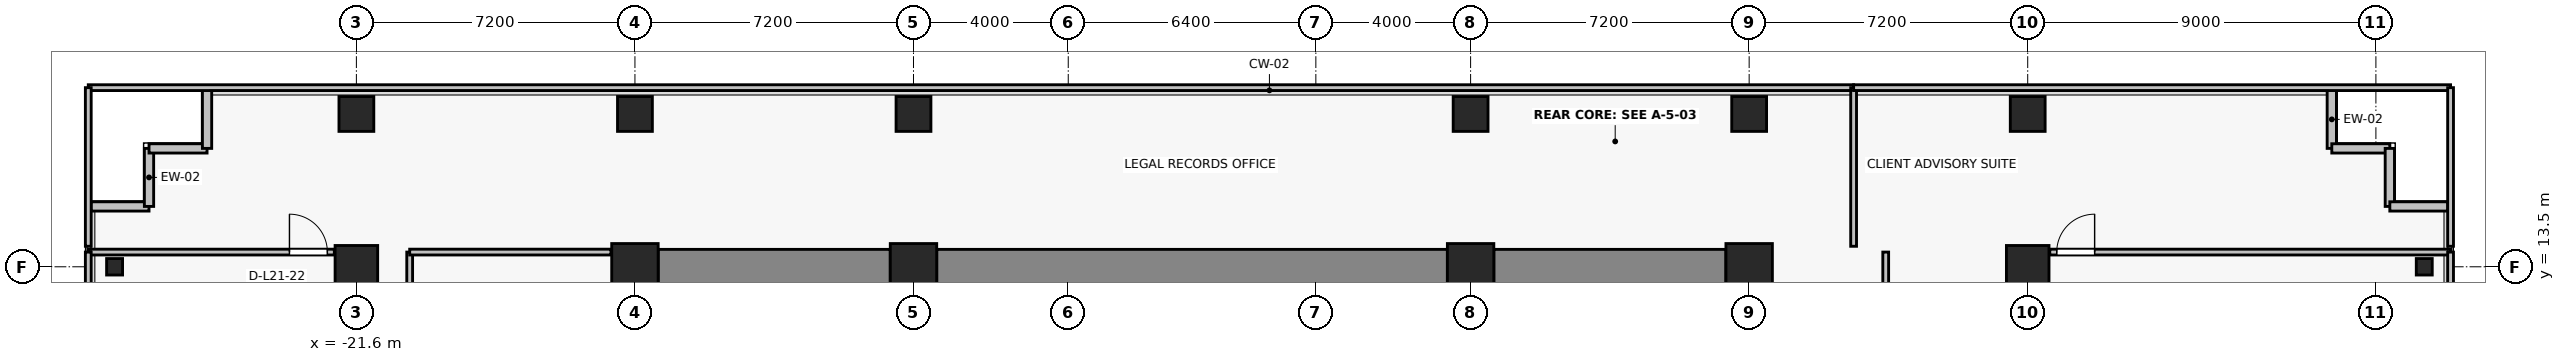
"""IFC4 building model, lengths in metres.
Left out: names, types, materials, properties, quantities, classifications, styles, units other than length and angle.
Written with IfcOpenShell. Run it as: python <this file> out.ifc"""

import sys

from ifc_helpers import new_model, si_unit, direction, frame, frame_2d, origin, origin_2d, place, context, subcontext, project, spatial, rectangle, i_section, extrude, source, transform, mapped, element, fill, save


model = new_model("IFC4")
c1 = context("Model", 3, precision=1e-05, world=origin(), true_north=direction((0.0, 1.0)))
c2 = subcontext(c1, "Body", "Model", "MODEL_VIEW")
j1 = project(units=[si_unit("LENGTHUNIT", "METRE"), si_unit("PLANEANGLEUNIT", "RADIAN")], contexts=[c1])
p1 = place(None, origin())
s1 = spatial("IfcSite", under=j1, at=p1, CompositionType="ELEMENT")
p2 = place(p1, origin())
s2 = spatial("IfcBuilding", under=s1, at=p2, CompositionType="ELEMENT")
p3 = place(p2, frame((0.0, 0.0, 76.9)))
s3 = spatial("IfcBuildingStorey", under=s2, at=p3, CompositionType="ELEMENT", Elevation=76.9)
for number, where, z_axis, x_axis in (
    (1, (-14.4, 13.5, 0.0), (0.0, 0.0, 1.0), (1.0, 0.0, 0.0)),
    (2, (-7.2, 13.5, 0.0), (0.0, 0.0, 1.0), (1.0, 0.0, 0.0)),
    (3, (7.2, 13.5, 0.0), (0.0, 0.0, 1.0), (1.0, 0.0, 0.0)),
    (4, (14.4, 13.5, 0.0), (0.0, 0.0, 1.0), (1.0, 0.0, 0.0)),
):
    element("IfcColumn", number, at=place(p3, frame(where, z_axis=z_axis, x_axis=x_axis)), inside=s3, PredefinedType="COLUMN", context=c2, shape_type="SweptSolid", body=[
        extrude(rectangle(XDim=1.2, YDim=1.2, at=origin_2d()), origin(), (0.0, 0.0, 1.0), 3.3),
    ])
for number, where, z_axis, x_axis in (
    (5, (-21.6, 13.5, 0.0), (0.0, 0.0, 1.0), (1.0, 0.0, 0.0)),
    (6, (21.6, 13.5, 0.0), (0.0, 0.0, 1.0), (1.0, 0.0, 0.0)),
):
    element("IfcColumn", number, at=place(p3, frame(where, z_axis=z_axis, x_axis=x_axis)), inside=s3, PredefinedType="COLUMN", context=c2, shape_type="SweptSolid", body=[
        extrude(rectangle(XDim=1.1, YDim=1.1, at=origin_2d()), origin(), (0.0, 0.0, 1.0), 3.3),
    ])
for number, where, z_axis, x_axis in (
    (7, (-14.4, 17.45, 0.0), (0.0, 0.0, 1.0), (1.0, 0.0, 0.0)),
    (8, (-7.2, 17.45, 0.0), (0.0, 0.0, 1.0), (1.0, 0.0, 0.0)),
    (9, (7.2, 17.45, 0.0), (0.0, 0.0, 1.0), (1.0, 0.0, 0.0)),
    (10, (14.4, 17.45, 0.0), (0.0, 0.0, 1.0), (1.0, 0.0, 0.0)),
    (11, (-21.6, 17.45, 0.0), (0.0, 0.0, 1.0), (1.0, 0.0, 0.0)),
    (12, (21.6, 17.45, 0.0), (0.0, 0.0, 1.0), (1.0, 0.0, 0.0)),
):
    element("IfcColumn", number, at=place(p3, frame(where, z_axis=z_axis, x_axis=x_axis)), inside=s3, PredefinedType="COLUMN", context=c2, shape_type="SweptSolid", body=[
        extrude(rectangle(XDim=0.9, YDim=0.9, at=origin_2d()), origin(), (0.0, 0.0, 1.0), 3.3),
    ])
for number, where, z_axis, x_axis in (
    (13, (-27.85, 13.5, 0.0), (0.0, 0.0, 1.0), (1.0, 0.0, 0.0)),
    (14, (31.85, 13.5, 0.0), (0.0, 0.0, 1.0), (1.0, 0.0, 0.0)),
):
    element("IfcColumn", number, at=place(p3, frame(where, z_axis=z_axis, x_axis=x_axis)), inside=s3, PredefinedType="COLUMN", context=c2, shape_type="SweptSolid", body=[
        extrude(i_section(OverallWidth=0.412, OverallDepth=0.425, WebThickness=0.026, FlangeThickness=0.039, FilletRadius=0.015, at=origin_2d()), origin(), (0.0, 0.0, 1.0), 3.3),
    ])
p4 = place(p3, frame((-13.8, 13.5, 0.0), z_axis=(0.0, 0.0, 1.0), x_axis=(1.0, 0.0, 0.0)))
e15 = element("IfcWall", 15, at=p4, inside=s3, PredefinedType="SHEAR", context=c2, shape_type="SweptSolid", body=[
    extrude(rectangle(XDim=6.0, YDim=0.9, at=frame_2d((3.0, 0.0))), origin(), (0.0, 0.0, 1.0), 3.05),
])
p5 = place(p3, frame((-6.6, 13.5, 0.0), z_axis=(0.0, 0.0, 1.0), x_axis=(1.0, 0.0, 0.0)))
e16 = element("IfcWall", 16, at=p5, inside=s3, PredefinedType="SHEAR", context=c2, shape_type="SweptSolid", body=[
    extrude(rectangle(XDim=13.2, YDim=0.9, at=frame_2d((6.6, 0.0))), origin(), (0.0, 0.0, 1.0), 3.05),
])
p6 = place(p3, frame((7.8, 13.5, 0.0), z_axis=(0.0, 0.0, 1.0), x_axis=(1.0, 0.0, 0.0)))
e17 = element("IfcWall", 17, at=p6, inside=s3, PredefinedType="SHEAR", context=c2, shape_type="SweptSolid", body=[
    extrude(rectangle(XDim=6.0, YDim=0.9, at=frame_2d((3.0, 0.0))), origin(), (0.0, 0.0, 1.0), 3.05),
])
for number, where, z_axis, x_axis in (
    (18, (-26.96, 15.06, 0.0), (0.0, 0.0, 1.0), (-1.0, 0.0, 0.0)),
    (19, (-26.96, 16.56, 0.0), (0.0, 0.0, 1.0), (0.0, -1.0, 0.0)),
    (20, (-25.46, 16.56, 0.0), (0.0, 0.0, 1.0), (-1.0, 0.0, 0.0)),
    (21, (-25.46, 18.06, 0.0), (0.0, 0.0, 1.0), (0.0, -1.0, 0.0)),
    (22, (29.46, 16.56, 0.0), (0.0, 0.0, 1.0), (0.0, 1.0, 0.0)),
    (23, (30.96, 16.56, 0.0), (0.0, 0.0, 1.0), (-1.0, 0.0, 0.0)),
    (24, (30.96, 15.06, 0.0), (0.0, 0.0, 1.0), (0.0, 1.0, 0.0)),
    (25, (32.46, 15.06, 0.0), (0.0, 0.0, 1.0), (-1.0, 0.0, 0.0)),
):
    element("IfcWall", number, at=place(p3, frame(where, z_axis=z_axis, x_axis=x_axis)), inside=s3, PredefinedType="SOLIDWALL", context=c2, shape_type="SweptSolid", body=[
        extrude(rectangle(XDim=1.5, YDim=0.24, at=frame_2d((0.75, 0.0))), origin(), (0.0, 0.0, 1.0), 3.05),
    ])
p7 = place(p3, frame((-28.53, 13.88, 0.0), z_axis=(0.0, 0.0, 1.0), x_axis=(1.0, 0.0, 0.0)))
e26 = element("IfcWall", 26, at=p7, inside=s3, PredefinedType="PARTITIONING", context=c2, shape_type="SweptSolid", body=[
    extrude(rectangle(XDim=6.36, YDim=0.15, at=frame_2d((3.18, 0.0))), origin(), (0.0, 0.0, 1.0), 3.05),
])
p8 = place(p7, frame((5.2, 0.0, 0.0)))
e27 = element("IfcOpeningElement", 27, at=p8, cuts=e26, PredefinedType="OPENING", context=c2, shape_type="SweptSolid", body=[
    extrude(rectangle(XDim=0.98, YDim=2.15, at=frame_2d((0.49, 1.075))), frame((0.0, 0.085, 0.0), z_axis=(0.0, -1.0, 0.0), x_axis=(1.0, 0.0, 0.0)), (0.0, 0.0, 1.0), 0.17),
])
p9 = place(p3, frame((-28.53, -1.77, 0.0), z_axis=(0.0, 0.0, 1.0), x_axis=(0.0, 1.0, 0.0)))
e28 = element("IfcWall", 28, at=p9, inside=s3, PredefinedType="PARTITIONING", context=c2, shape_type="SweptSolid", body=[
    extrude(rectangle(XDim=15.65, YDim=0.15, at=frame_2d((7.825, 0.0))), origin(), (0.0, 0.0, 1.0), 3.05),
])
p10 = place(p3, frame((-20.222, 13.88, 0.0), z_axis=(0.0, 0.0, 1.0), x_axis=(0.0, -1.0, 0.0)))
e29 = element("IfcWall", 29, at=p10, inside=s3, PredefinedType="PARTITIONING", context=c2, shape_type="SweptSolid", body=[
    extrude(rectangle(XDim=15.65, YDim=0.15, at=frame_2d((7.825, 0.0))), origin(), (0.0, 0.0, 1.0), 2.44),
])
p11 = place(p3, frame((-20.222, 13.88, 0.0), z_axis=(0.0, 0.0, 1.0), x_axis=(1.0, 0.0, 0.0)))
e30 = element("IfcWall", 30, at=p11, inside=s3, PredefinedType="PARTITIONING", context=c2, shape_type="SweptSolid", body=[
    extrude(rectangle(XDim=5.202, YDim=0.15, at=frame_2d((2.601, 0.0))), origin(), (0.0, 0.0, 1.0), 3.05),
])
p12 = place(p3, frame((22.17, 13.88, 0.0), z_axis=(0.0, 0.0, 1.0), x_axis=(1.0, 0.0, 0.0)))
e31 = element("IfcWall", 31, at=p12, inside=s3, PredefinedType="PARTITIONING", context=c2, shape_type="SweptSolid", body=[
    extrude(rectangle(XDim=10.36, YDim=0.15, at=frame_2d((5.18, 0.0))), origin(), (0.0, 0.0, 1.0), 3.05),
])
p13 = place(p12, frame((0.18, 0.0, 0.0)))
e32 = element("IfcOpeningElement", 32, at=p13, cuts=e31, PredefinedType="OPENING", context=c2, shape_type="SweptSolid", body=[
    extrude(rectangle(XDim=0.98, YDim=2.15, at=frame_2d((0.49, 1.075))), frame((0.0, 0.085, 0.0), z_axis=(0.0, -1.0, 0.0), x_axis=(1.0, 0.0, 0.0)), (0.0, 0.0, 1.0), 0.17),
])
p14 = place(p3, frame((17.93, 9.693, 0.0), z_axis=(0.0, 0.0, 1.0), x_axis=(0.0, 1.0, 0.0)))
e33 = element("IfcWall", 33, at=p14, inside=s3, PredefinedType="PARTITIONING", context=c2, shape_type="SweptSolid", body=[
    extrude(rectangle(XDim=4.187, YDim=0.15, at=frame_2d((2.093, 0.0))), origin(), (0.0, 0.0, 1.0), 2.44),
])
p15 = place(p14, frame((1.604, 0.0, 0.0)))
e34 = element("IfcOpeningElement", 34, at=p15, cuts=e33, PredefinedType="OPENING", context=c2, shape_type="SweptSolid", body=[
    extrude(rectangle(XDim=0.98, YDim=2.15, at=frame_2d((0.49, 1.075))), frame((0.0, 0.085, 0.0), z_axis=(0.0, -1.0, 0.0), x_axis=(1.0, 0.0, 0.0)), (0.0, 0.0, 1.0), 0.17),
])
p16 = place(p3, frame((32.53, 13.88, 0.0), z_axis=(0.0, 0.0, 1.0), x_axis=(0.0, -1.0, 0.0)))
e35 = element("IfcWall", 35, at=p16, inside=s3, PredefinedType="PARTITIONING", context=c2, shape_type="SweptSolid", body=[
    extrude(rectangle(XDim=4.187, YDim=0.15, at=frame_2d((2.093, 0.0))), origin(), (0.0, 0.0, 1.0), 3.05),
])
p17 = place(p3, frame((-28.53, 18.13, 0.0), z_axis=(0.0, 0.0, 1.0), x_axis=(1.0, 0.0, 0.0)))
e36 = element("IfcWall", 36, at=p17, inside=s3, PredefinedType="PARTITIONING", context=c2, shape_type="SweptSolid", body=[
    extrude(rectangle(XDim=45.63, YDim=0.15, at=frame_2d((22.815, 0.0))), origin(), (0.0, 0.0, 1.0), 3.05),
])
p18 = place(p3, frame((-28.53, 14.03, 0.0), z_axis=(0.0, 0.0, 1.0), x_axis=(0.0, 1.0, 0.0)))
e37 = element("IfcWall", 37, at=p18, inside=s3, PredefinedType="PARTITIONING", context=c2, shape_type="SweptSolid", body=[
    extrude(rectangle(XDim=4.1, YDim=0.15, at=frame_2d((2.05, 0.0))), origin(), (0.0, 0.0, 1.0), 3.05),
])
p19 = place(p3, frame((17.1, 18.13, 0.0), z_axis=(0.0, 0.0, 1.0), x_axis=(0.0, -1.0, 0.0)))
e38 = element("IfcWall", 38, at=p19, inside=s3, PredefinedType="PARTITIONING", context=c2, shape_type="SweptSolid", body=[
    extrude(rectangle(XDim=4.1, YDim=0.15, at=frame_2d((2.05, 0.0))), origin(), (0.0, 0.0, 1.0), 2.44),
])
p20 = place(p3, frame((17.1, 18.13, 0.0), z_axis=(0.0, 0.0, 1.0), x_axis=(1.0, 0.0, 0.0)))
e39 = element("IfcWall", 39, at=p20, inside=s3, PredefinedType="PARTITIONING", context=c2, shape_type="SweptSolid", body=[
    extrude(rectangle(XDim=15.43, YDim=0.15, at=frame_2d((7.715, 0.0))), origin(), (0.0, 0.0, 1.0), 3.05),
])
p21 = place(p3, frame((32.53, 18.13, 0.0), z_axis=(0.0, 0.0, 1.0), x_axis=(0.0, -1.0, 0.0)))
e40 = element("IfcWall", 40, at=p21, inside=s3, PredefinedType="PARTITIONING", context=c2, shape_type="SweptSolid", body=[
    extrude(rectangle(XDim=4.1, YDim=0.15, at=frame_2d((2.05, 0.0))), origin(), (0.0, 0.0, 1.0), 3.05),
])
m1 = source(origin(), c2, "Body", "SweptSolid", [
    extrude(rectangle(XDim=0.98, YDim=2.15, at=frame_2d((0.49, 1.075))), frame((0.0, 0.025, 0.0), z_axis=(0.0, -1.0, 0.0), x_axis=(1.0, 0.0, 0.0)), (0.0, 0.0, 1.0), 0.05),
])
p22 = place(p8, origin())
e41 = element("IfcDoor", 41, at=p22, inside=s3, OperationType="SINGLE_SWING_LEFT", PredefinedType="DOOR", context=c2, shape_type="MappedRepresentation", body=[
    mapped(m1, transform((0.0, 0.0, 0.0), x_axis=(1.0, 0.0, 0.0), y_axis=(0.0, 1.0, 0.0), z_axis=(0.0, 0.0, 1.0), scale=1.0)),
])
fill(e27, e41)
p23 = place(p13, origin())
e42 = element("IfcDoor", 42, at=p23, inside=s3, OperationType="SINGLE_SWING_RIGHT", PredefinedType="DOOR", context=c2, shape_type="MappedRepresentation", body=[
    mapped(m1, transform((0.0, 0.0, 0.0), x_axis=(1.0, 0.0, 0.0), y_axis=(0.0, 1.0, 0.0), z_axis=(0.0, 0.0, 1.0), scale=1.0)),
])
fill(e32, e42)
save(model, sys.argv[1])
